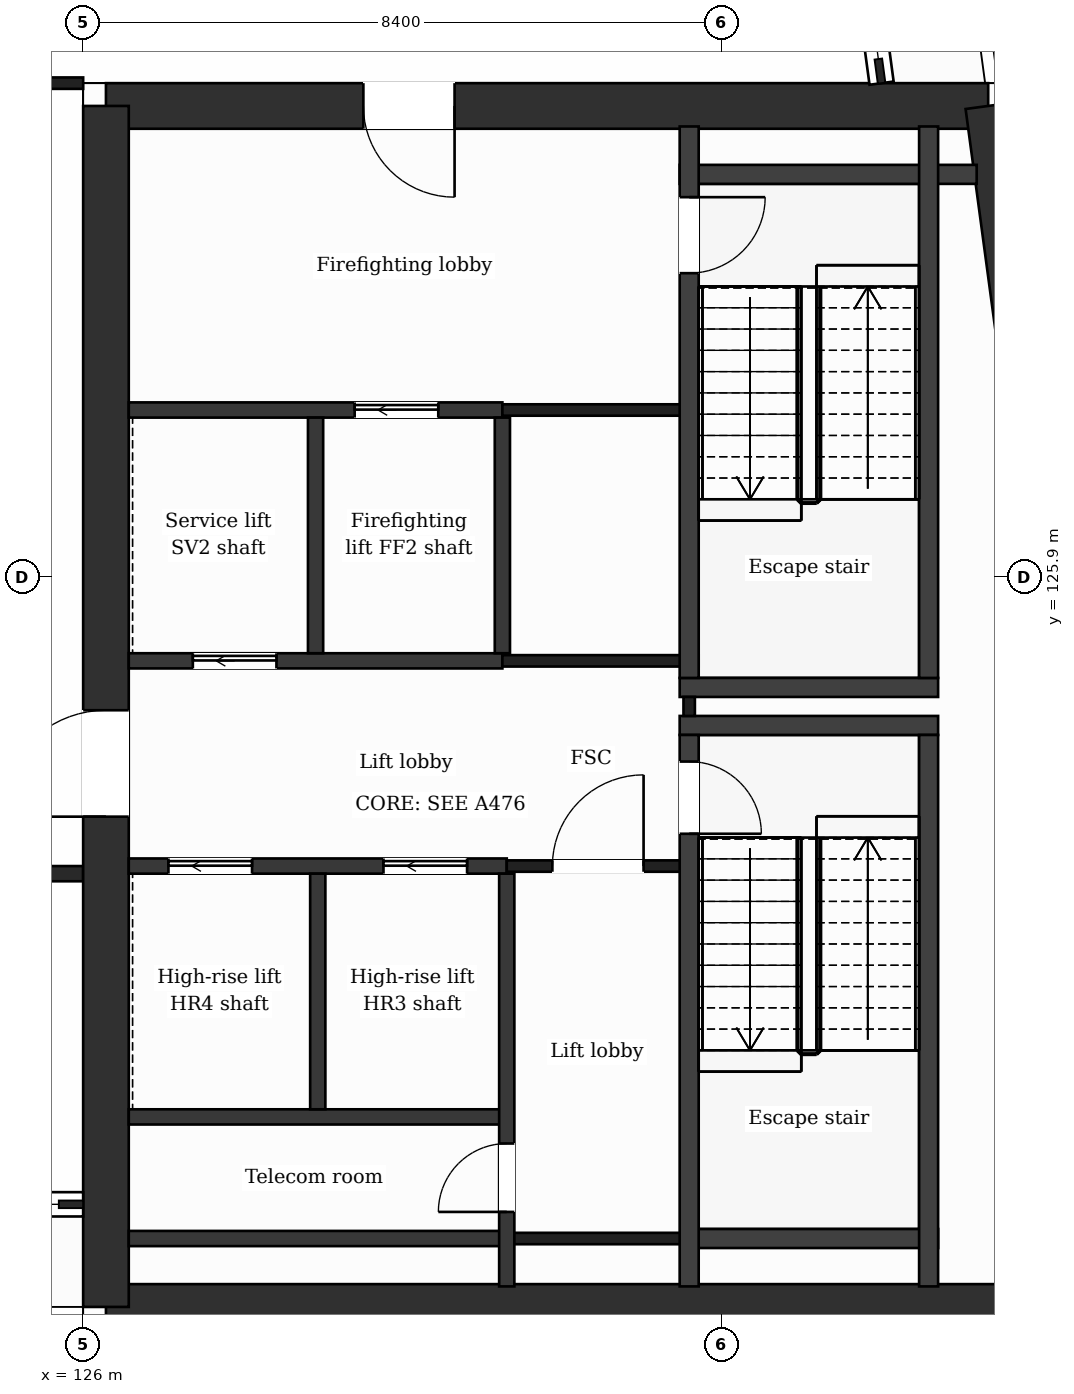
"""IFC4 building model, lengths in metres.
Left out: names, types, materials, properties, quantities, classifications, styles, units other than length and angle.
Written with IfcOpenShell. Run it as: python <this file> out.ifc"""

import sys

from ifc_helpers import new_model, si_unit, direction, frame, frame_2d, origin, place, context, subcontext, project, spatial, rectangle, extrude, element, fill, save


model = new_model("IFC4")
c1 = context("Model", 3, precision=1e-05, world=origin(), true_north=direction((0.0, 1.0)))
c2 = subcontext(c1, "Body", "Model", "MODEL_VIEW")
j1 = project(units=[si_unit("LENGTHUNIT", "METRE"), si_unit("PLANEANGLEUNIT", "RADIAN")], contexts=[c1])
p1 = place(None, origin())
s1 = spatial("IfcSite", under=j1, at=p1, CompositionType="ELEMENT")
p2 = place(p1, origin())
s2 = spatial("IfcBuilding", under=s1, at=p2, CompositionType="ELEMENT")
p3 = place(p2, frame((0.0, 0.0, 307.9)))
s3 = spatial("IfcBuildingStorey", under=s2, at=p3, CompositionType="ELEMENT", Elevation=307.9)
p4 = place(p3, frame((126.3, 132.1, 0.0), z_axis=(0.0, 0.0, 1.0), x_axis=(1.0, 0.0, 0.0)))
e1 = element("IfcWall", 1, at=p4, inside=s3, PredefinedType="SHEAR", context=c2, shape_type="SweptSolid", body=[
    extrude(rectangle(XDim=11.607, YDim=0.6, at=frame_2d((5.803, 0.0))), origin(), (0.0, 0.0, 1.0), 7.5),
])
p5 = place(p4, frame((3.386, 0.0, 0.0)))
e2 = element("IfcOpeningElement", 2, at=p5, cuts=e1, PredefinedType="OPENING", context=c2, shape_type="SweptSolid", body=[
    extrude(rectangle(XDim=1.2, YDim=2.1, at=frame_2d((0.6, 1.05))), frame((0.0, 0.31, 0.0), z_axis=(0.0, -1.0, 0.0), x_axis=(1.0, 0.0, 0.0)), (0.0, 0.0, 1.0), 0.62),
])
p6 = place(p3, frame((137.907, 132.1, 0.0), z_axis=(0.0, 0.0, 1.0), x_axis=(0.13341345841, -0.991060466932, 0.0)))
e3 = element("IfcWall", 3, at=p6, inside=s3, PredefinedType="SHEAR", context=c2, shape_type="SweptSolid", body=[
    extrude(rectangle(XDim=15.943, YDim=0.6, at=frame_2d((7.971, 0.0))), origin(), (0.0, 0.0, 1.0), 7.5),
])
p7 = place(p3, frame((140.034, 116.3, 0.0), z_axis=(0.0, 0.0, 1.0), x_axis=(-1.0, 0.0, 0.0)))
e4 = element("IfcWall", 4, at=p7, inside=s3, PredefinedType="SHEAR", context=c2, shape_type="SweptSolid", body=[
    extrude(rectangle(XDim=13.734, YDim=0.6, at=frame_2d((6.867, 0.0))), origin(), (0.0, 0.0, 1.0), 7.5),
])
p8 = place(p3, frame((126.3, 116.3, 0.0), z_axis=(0.0, 0.0, 1.0), x_axis=(0.0, 1.0, 0.0)))
e5 = element("IfcWall", 5, at=p8, inside=s3, PredefinedType="SHEAR", context=c2, shape_type="SweptSolid", body=[
    extrude(rectangle(XDim=15.8, YDim=0.6, at=frame_2d((7.9, 0.0))), origin(), (0.0, 0.0, 1.0), 7.5),
])
p9 = place(p8, frame((6.45, 0.0, 0.0)))
e6 = element("IfcOpeningElement", 6, at=p9, cuts=e5, PredefinedType="OPENING", context=c2, shape_type="SweptSolid", body=[
    extrude(rectangle(XDim=1.4, YDim=2.1, at=frame_2d((0.7, 1.05))), frame((0.0, 0.31, 0.0), z_axis=(0.0, -1.0, 0.0), x_axis=(1.0, 0.0, 0.0)), (0.0, 0.0, 1.0), 0.62),
])
p10 = place(p3, frame((126.6, 117.2, 0.0), z_axis=(0.0, 0.0, 1.0), x_axis=(1.0, 0.0, 0.0)))
e7 = element("IfcWall", 7, at=p10, inside=s3, PredefinedType="PARTITIONING", context=c2, shape_type="SweptSolid", body=[
    extrude(rectangle(XDim=4.973, YDim=0.2, at=frame_2d((2.486, 0.0))), origin(), (0.0, 0.0, 1.0), 7.05),
])
p11 = place(p3, frame((131.573, 117.2, 0.0), z_axis=(0.0, 0.0, 1.0), x_axis=(1.0, 0.0, 0.0)))
e8 = element("IfcWall", 8, at=p11, inside=s3, PredefinedType="PARTITIONING", context=c2, shape_type="SweptSolid", body=[
    extrude(rectangle(XDim=2.4, YDim=0.15, at=frame_2d((1.2, 0.0))), origin(), (0.0, 0.0, 1.0), 7.05),
])
p12 = place(p3, frame((133.973, 117.2, 0.0), z_axis=(0.0, 0.0, 1.0), x_axis=(1.0, 0.0, 0.0)))
e9 = element("IfcWall", 9, at=p12, inside=s3, PredefinedType="PARTITIONING", context=c2, shape_type="SweptSolid", body=[
    extrude(rectangle(XDim=3.275, YDim=0.25, at=frame_2d((1.638, 0.0))), origin(), (0.0, 0.0, 1.0), 7.05),
])
p13 = place(p3, frame((126.6, 118.8, 0.0), z_axis=(0.0, 0.0, 1.0), x_axis=(1.0, 0.0, 0.0)))
e10 = element("IfcWall", 10, at=p13, inside=s3, PredefinedType="PARTITIONING", context=c2, shape_type="SweptSolid", body=[
    extrude(rectangle(XDim=4.973, YDim=0.2, at=frame_2d((2.486, 0.0))), origin(), (0.0, 0.0, 1.0), 7.05),
])
p14 = place(p3, frame((117.5, 122.0, 0.0), z_axis=(0.0, 0.0, 1.0), x_axis=(1.0, 0.0, 0.0)))
e11 = element("IfcWall", 11, at=p14, inside=s3, PredefinedType="PARTITIONING", context=c2, shape_type="SweptSolid", body=[
    extrude(rectangle(XDim=8.5, YDim=0.2, at=frame_2d((4.25, 0.0))), origin(), (0.0, 0.0, 1.0), 7.05),
])
p15 = place(p3, frame((126.6, 122.1, 0.0), z_axis=(0.0, 0.0, 1.0), x_axis=(1.0, 0.0, 0.0)))
e12 = element("IfcWall", 12, at=p15, inside=s3, PredefinedType="PARTITIONING", context=c2, shape_type="SweptSolid", body=[
    extrude(rectangle(XDim=4.973, YDim=0.2, at=frame_2d((2.486, 0.0))), origin(), (0.0, 0.0, 1.0), 7.05),
])
p16 = place(p15, frame((3.351, 0.0, 0.0)))
e13 = element("IfcOpeningElement", 13, at=p16, cuts=e12, PredefinedType="OPENING", context=c2, shape_type="SweptSolid", body=[
    extrude(rectangle(XDim=1.1, YDim=2.1, at=frame_2d((0.55, 1.05))), frame((0.0, 0.11, 0.0), z_axis=(0.0, -1.0, 0.0), x_axis=(1.0, 0.0, 0.0)), (0.0, 0.0, 1.0), 0.22),
])
p17 = place(p15, frame((0.522, 0.0, 0.0)))
e14 = element("IfcOpeningElement", 14, at=p17, cuts=e12, PredefinedType="OPENING", context=c2, shape_type="SweptSolid", body=[
    extrude(rectangle(XDim=1.1, YDim=2.1, at=frame_2d((0.55, 1.05))), frame((0.0, 0.11, 0.0), z_axis=(0.0, -1.0, 0.0), x_axis=(1.0, 0.0, 0.0)), (0.0, 0.0, 1.0), 0.22),
])
p18 = place(p3, frame((131.573, 122.1, 0.0), z_axis=(0.0, 0.0, 1.0), x_axis=(1.0, 0.0, 0.0)))
e15 = element("IfcWall", 15, at=p18, inside=s3, PredefinedType="PARTITIONING", context=c2, shape_type="SweptSolid", body=[
    extrude(rectangle(XDim=2.4, YDim=0.15, at=frame_2d((1.2, 0.0))), origin(), (0.0, 0.0, 1.0), 7.05),
])
p19 = place(p18, frame((0.6, 0.0, 0.0)))
e16 = element("IfcOpeningElement", 16, at=p19, cuts=e15, PredefinedType="OPENING", context=c2, shape_type="SweptSolid", body=[
    extrude(rectangle(XDim=1.2, YDim=2.1, at=frame_2d((0.6, 1.05))), frame((0.0, 0.085, 0.0), z_axis=(0.0, -1.0, 0.0), x_axis=(1.0, 0.0, 0.0)), (0.0, 0.0, 1.0), 0.17),
])
for number, where, z_axis, x_axis in (
    (17, (133.848, 123.95, 0.0), (0.0, 0.0, 1.0), (1.0, 0.0, 0.0)),
    (18, (133.848, 124.45, 0.0), (0.0, 0.0, 1.0), (1.0, 0.0, 0.0)),
):
    element("IfcWall", number, at=place(p3, frame(where, z_axis=z_axis, x_axis=x_axis)), inside=s3, PredefinedType="PARTITIONING", context=c2, shape_type="SweptSolid", body=[
        extrude(rectangle(XDim=3.4, YDim=0.25, at=frame_2d((1.7, 0.0))), origin(), (0.0, 0.0, 1.0), 7.05),
    ])
p20 = place(p3, frame((126.6, 124.8, 0.0), z_axis=(0.0, 0.0, 1.0), x_axis=(1.0, 0.0, 0.0)))
e19 = element("IfcWall", 19, at=p20, inside=s3, PredefinedType="PARTITIONING", context=c2, shape_type="SweptSolid", body=[
    extrude(rectangle(XDim=4.915, YDim=0.2, at=frame_2d((2.458, 0.0))), origin(), (0.0, 0.0, 1.0), 7.05),
])
p21 = place(p20, frame((0.843, 0.0, 0.0)))
e20 = element("IfcOpeningElement", 20, at=p21, cuts=e19, PredefinedType="OPENING", context=c2, shape_type="SweptSolid", body=[
    extrude(rectangle(XDim=1.1, YDim=2.1, at=frame_2d((0.55, 1.05))), frame((0.0, 0.11, 0.0), z_axis=(0.0, -1.0, 0.0), x_axis=(1.0, 0.0, 0.0)), (0.0, 0.0, 1.0), 0.22),
])
p22 = place(p3, frame((131.515, 124.8, 0.0), z_axis=(0.0, 0.0, 1.0), x_axis=(1.0, 0.0, 0.0)))
e21 = element("IfcWall", 21, at=p22, inside=s3, PredefinedType="PARTITIONING", context=c2, shape_type="SweptSolid", body=[
    extrude(rectangle(XDim=2.583, YDim=0.15, at=frame_2d((1.291, 0.0))), origin(), (0.0, 0.0, 1.0), 7.05),
])
p23 = place(p3, frame((126.6, 128.1, 0.0), z_axis=(0.0, 0.0, 1.0), x_axis=(1.0, 0.0, 0.0)))
e22 = element("IfcWall", 22, at=p23, inside=s3, PredefinedType="PARTITIONING", context=c2, shape_type="SweptSolid", body=[
    extrude(rectangle(XDim=4.915, YDim=0.2, at=frame_2d((2.458, 0.0))), origin(), (0.0, 0.0, 1.0), 7.05),
])
p24 = place(p23, frame((2.972, 0.0, 0.0)))
e23 = element("IfcOpeningElement", 23, at=p24, cuts=e22, PredefinedType="OPENING", context=c2, shape_type="SweptSolid", body=[
    extrude(rectangle(XDim=1.1, YDim=2.1, at=frame_2d((0.55, 1.05))), frame((0.0, 0.11, 0.0), z_axis=(0.0, -1.0, 0.0), x_axis=(1.0, 0.0, 0.0)), (0.0, 0.0, 1.0), 0.22),
])
p25 = place(p3, frame((131.515, 128.1, 0.0), z_axis=(0.0, 0.0, 1.0), x_axis=(1.0, 0.0, 0.0)))
e24 = element("IfcWall", 24, at=p25, inside=s3, PredefinedType="PARTITIONING", context=c2, shape_type="SweptSolid", body=[
    extrude(rectangle(XDim=2.458, YDim=0.15, at=frame_2d((1.229, 0.0))), origin(), (0.0, 0.0, 1.0), 7.05),
])
p26 = place(p3, frame((133.848, 131.2, 0.0), z_axis=(0.0, 0.0, 1.0), x_axis=(1.0, 0.0, 0.0)))
e25 = element("IfcWall", 25, at=p26, inside=s3, PredefinedType="PARTITIONING", context=c2, shape_type="SweptSolid", body=[
    extrude(rectangle(XDim=3.907, YDim=0.25, at=frame_2d((1.954, 0.0))), origin(), (0.0, 0.0, 1.0), 7.05),
])
p27 = place(p3, frame((100.8, 132.4, 0.0), z_axis=(0.0, 0.0, 1.0), x_axis=(1.0, 0.0, 0.0)))
e26 = element("IfcWall", 26, at=p27, inside=s3, PredefinedType="PARTITIONING", context=c2, shape_type="SweptSolid", body=[
    extrude(rectangle(XDim=25.2, YDim=0.15, at=frame_2d((12.6, 0.0))), origin(), (0.0, 0.0, 1.0), 7.05),
])
p28 = place(p27, frame((9.28, 0.0, 0.0)))
e27 = element("IfcOpeningElement", 27, at=p28, cuts=e26, PredefinedType="OPENING", context=c2, shape_type="SweptSolid", body=[
    extrude(rectangle(XDim=2.4, YDim=2.1, at=frame_2d((1.2, 1.05))), frame((0.0, 0.085, 0.0), z_axis=(0.0, -1.0, 0.0), x_axis=(1.0, 0.0, 0.0)), (0.0, 0.0, 1.0), 0.17),
])
p29 = place(p27, frame((13.52, 0.0, 0.0)))
e28 = element("IfcOpeningElement", 28, at=p29, cuts=e26, PredefinedType="OPENING", context=c2, shape_type="SweptSolid", body=[
    extrude(rectangle(XDim=2.4, YDim=2.1, at=frame_2d((1.2, 1.05))), frame((0.0, 0.085, 0.0), z_axis=(0.0, -1.0, 0.0), x_axis=(1.0, 0.0, 0.0)), (0.0, 0.0, 1.0), 0.17),
])
for number, where, z_axis, x_axis in (
    (29, (129.058, 124.9, 0.0), (0.0, 0.0, 1.0), (0.0, 1.0, 0.0)),
    (30, (129.086, 118.9, 0.0), (0.0, 0.0, 1.0), (0.0, 1.0, 0.0)),
    (31, (131.515, 124.9, 0.0), (0.0, 0.0, 1.0), (0.0, 1.0, 0.0)),
):
    element("IfcWall", number, at=place(p3, frame(where, z_axis=z_axis, x_axis=x_axis)), inside=s3, PredefinedType="PARTITIONING", context=c2, shape_type="SweptSolid", body=[
        extrude(rectangle(XDim=3.1, YDim=0.2, at=frame_2d((1.55, 0.0))), origin(), (0.0, 0.0, 1.0), 7.05),
    ])
p30 = place(p3, frame((131.573, 116.57, 0.0), z_axis=(0.0, 0.0, 1.0), x_axis=(0.0, 1.0, 0.0)))
e32 = element("IfcWall", 32, at=p30, inside=s3, PredefinedType="PARTITIONING", context=c2, shape_type="SweptSolid", body=[
    extrude(rectangle(XDim=5.43, YDim=0.2, at=frame_2d((2.715, 0.0))), origin(), (0.0, 0.0, 1.0), 7.05),
])
p31 = place(p30, frame((0.98, 0.0, 0.0)))
e33 = element("IfcOpeningElement", 33, at=p31, cuts=e32, PredefinedType="OPENING", context=c2, shape_type="SweptSolid", body=[
    extrude(rectangle(XDim=0.9, YDim=2.1, at=frame_2d((0.45, 1.05))), frame((0.0, 0.11, 0.0), z_axis=(0.0, -1.0, 0.0), x_axis=(1.0, 0.0, 0.0)), (0.0, 0.0, 1.0), 0.22),
])
p32 = place(p3, frame((133.973, 124.075, 0.0), z_axis=(0.0, 0.0, 1.0), x_axis=(0.0, 1.0, 0.0)))
e34 = element("IfcWall", 34, at=p32, inside=s3, PredefinedType="PARTITIONING", context=c2, shape_type="SweptSolid", body=[
    extrude(rectangle(XDim=0.25, YDim=0.15, at=frame_2d((0.125, 0.0))), origin(), (0.0, 0.0, 1.0), 7.05),
])
p33 = place(p3, frame((133.973, 116.57, 0.0), z_axis=(0.0, 0.0, 1.0), x_axis=(0.0, 1.0, 0.0)))
e35 = element("IfcWall", 35, at=p33, inside=s3, PredefinedType="PARTITIONING", context=c2, shape_type="SweptSolid", body=[
    extrude(rectangle(XDim=7.255, YDim=0.25, at=frame_2d((3.627, 0.0))), origin(), (0.0, 0.0, 1.0), 7.05),
])
p34 = place(p33, frame((5.955, 0.0, 0.0)))
e36 = element("IfcOpeningElement", 36, at=p34, cuts=e35, PredefinedType="OPENING", context=c2, shape_type="SweptSolid", body=[
    extrude(rectangle(XDim=0.95, YDim=2.1, at=frame_2d((0.475, 1.05))), frame((0.0, 0.135, 0.0), z_axis=(0.0, -1.0, 0.0), x_axis=(1.0, 0.0, 0.0)), (0.0, 0.0, 1.0), 0.27),
])
p35 = place(p3, frame((133.973, 124.575, 0.0), z_axis=(0.0, 0.0, 1.0), x_axis=(0.0, 1.0, 0.0)))
e37 = element("IfcWall", 37, at=p35, inside=s3, PredefinedType="PARTITIONING", context=c2, shape_type="SweptSolid", body=[
    extrude(rectangle(XDim=7.255, YDim=0.25, at=frame_2d((3.627, 0.0))), origin(), (0.0, 0.0, 1.0), 7.05),
])
p36 = place(p35, frame((5.325, 0.0, 0.0)))
e38 = element("IfcOpeningElement", 38, at=p36, cuts=e37, PredefinedType="OPENING", context=c2, shape_type="SweptSolid", body=[
    extrude(rectangle(XDim=1.0, YDim=2.1, at=frame_2d((0.5, 1.05))), frame((0.0, 0.135, 0.0), z_axis=(0.0, -1.0, 0.0), x_axis=(1.0, 0.0, 0.0)), (0.0, 0.0, 1.0), 0.27),
])
p37 = place(p3, frame((137.123, 116.57, 0.0), z_axis=(0.0, 0.0, 1.0), x_axis=(0.0, 1.0, 0.0)))
e39 = element("IfcWall", 39, at=p37, inside=s3, PredefinedType="PARTITIONING", context=c2, shape_type="SweptSolid", body=[
    extrude(rectangle(XDim=7.255, YDim=0.25, at=frame_2d((3.627, 0.0))), origin(), (0.0, 0.0, 1.0), 7.05),
])
p38 = place(p3, frame((137.123, 124.575, 0.0), z_axis=(0.0, 0.0, 1.0), x_axis=(0.0, 1.0, 0.0)))
e40 = element("IfcWall", 40, at=p38, inside=s3, PredefinedType="PARTITIONING", context=c2, shape_type="SweptSolid", body=[
    extrude(rectangle(XDim=7.255, YDim=0.25, at=frame_2d((3.627, 0.0))), origin(), (0.0, 0.0, 1.0), 7.05),
])
p39 = place(p19, origin())
e41 = element("IfcDoor", 41, at=p39, inside=s3, OperationType="SINGLE_SWING_RIGHT", PredefinedType="DOOR", context=c2, shape_type="SweptSolid", body=[
    extrude(rectangle(XDim=1.2, YDim=2.1, at=frame_2d((0.6, 1.05))), frame((0.0, 0.025, 0.0), z_axis=(0.0, -1.0, 0.0), x_axis=(1.0, 0.0, 0.0)), (0.0, 0.0, 1.0), 0.05),
])
fill(e16, e41)
p40 = place(p16, origin())
e42 = element("IfcDoor", 42, at=p40, inside=s3, OperationType="SLIDING_TO_LEFT", PredefinedType="DOOR", context=c2, shape_type="SweptSolid", body=[
    extrude(rectangle(XDim=1.1, YDim=2.1, at=frame_2d((0.55, 1.05))), frame((0.0, 0.025, 0.0), z_axis=(0.0, -1.0, 0.0), x_axis=(1.0, 0.0, 0.0)), (0.0, 0.0, 1.0), 0.05),
])
fill(e13, e42)
p41 = place(p17, origin())
e43 = element("IfcDoor", 43, at=p41, inside=s3, OperationType="SLIDING_TO_LEFT", PredefinedType="DOOR", context=c2, shape_type="SweptSolid", body=[
    extrude(rectangle(XDim=1.1, YDim=2.1, at=frame_2d((0.55, 1.05))), frame((0.0, 0.025, 0.0), z_axis=(0.0, -1.0, 0.0), x_axis=(1.0, 0.0, 0.0)), (0.0, 0.0, 1.0), 0.05),
])
fill(e14, e43)
p42 = place(p24, origin())
e44 = element("IfcDoor", 44, at=p42, inside=s3, OperationType="SLIDING_TO_LEFT", PredefinedType="DOOR", context=c2, shape_type="SweptSolid", body=[
    extrude(rectangle(XDim=1.1, YDim=2.1, at=frame_2d((0.55, 1.05))), frame((0.0, 0.025, 0.0), z_axis=(0.0, -1.0, 0.0), x_axis=(1.0, 0.0, 0.0)), (0.0, 0.0, 1.0), 0.05),
])
fill(e23, e44)
p43 = place(p21, origin())
e45 = element("IfcDoor", 45, at=p43, inside=s3, OperationType="SLIDING_TO_LEFT", PredefinedType="DOOR", context=c2, shape_type="SweptSolid", body=[
    extrude(rectangle(XDim=1.1, YDim=2.1, at=frame_2d((0.55, 1.05))), frame((0.0, 0.025, 0.0), z_axis=(0.0, -1.0, 0.0), x_axis=(1.0, 0.0, 0.0)), (0.0, 0.0, 1.0), 0.05),
])
fill(e20, e45)
p44 = place(p34, origin())
e46 = element("IfcDoor", 46, at=p44, inside=s3, OperationType="SINGLE_SWING_LEFT", PredefinedType="DOOR", context=c2, shape_type="SweptSolid", body=[
    extrude(rectangle(XDim=0.95, YDim=2.1, at=frame_2d((0.475, 1.05))), frame((0.0, 0.025, 0.0), z_axis=(0.0, -1.0, 0.0), x_axis=(1.0, 0.0, 0.0)), (0.0, 0.0, 1.0), 0.05),
])
fill(e36, e46)
p45 = place(p36, origin())
e47 = element("IfcDoor", 47, at=p45, inside=s3, OperationType="SINGLE_SWING_RIGHT", PredefinedType="DOOR", context=c2, shape_type="SweptSolid", body=[
    extrude(rectangle(XDim=1.0, YDim=2.1, at=frame_2d((0.5, 1.05))), frame((0.0, 0.025, 0.0), z_axis=(0.0, -1.0, 0.0), x_axis=(1.0, 0.0, 0.0)), (0.0, 0.0, 1.0), 0.05),
])
fill(e38, e47)
p46 = place(p31, origin())
e48 = element("IfcDoor", 48, at=p46, inside=s3, OperationType="SINGLE_SWING_LEFT", PredefinedType="DOOR", context=c2, shape_type="SweptSolid", body=[
    extrude(rectangle(XDim=0.9, YDim=2.1, at=frame_2d((0.45, 1.05))), frame((0.0, 0.025, 0.0), z_axis=(0.0, -1.0, 0.0), x_axis=(1.0, 0.0, 0.0)), (0.0, 0.0, 1.0), 0.05),
])
fill(e33, e48)
p47 = place(p5, origin())
e49 = element("IfcDoor", 49, at=p47, inside=s3, OperationType="SINGLE_SWING_RIGHT", PredefinedType="DOOR", context=c2, shape_type="SweptSolid", body=[
    extrude(rectangle(XDim=1.2, YDim=2.1, at=frame_2d((0.6, 1.05))), frame((0.0, 0.025, 0.0), z_axis=(0.0, -1.0, 0.0), x_axis=(1.0, 0.0, 0.0)), (0.0, 0.0, 1.0), 0.05),
])
fill(e2, e49)
p48 = place(p9, origin())
e50 = element("IfcDoor", 50, at=p48, inside=s3, OperationType="SINGLE_SWING_LEFT", PredefinedType="DOOR", context=c2, shape_type="SweptSolid", body=[
    extrude(rectangle(XDim=1.4, YDim=2.1, at=frame_2d((0.7, 1.05))), frame((0.0, 0.025, 0.0), z_axis=(0.0, -1.0, 0.0), x_axis=(1.0, 0.0, 0.0)), (0.0, 0.0, 1.0), 0.05),
])
fill(e6, e50)
save(model, sys.argv[1])
